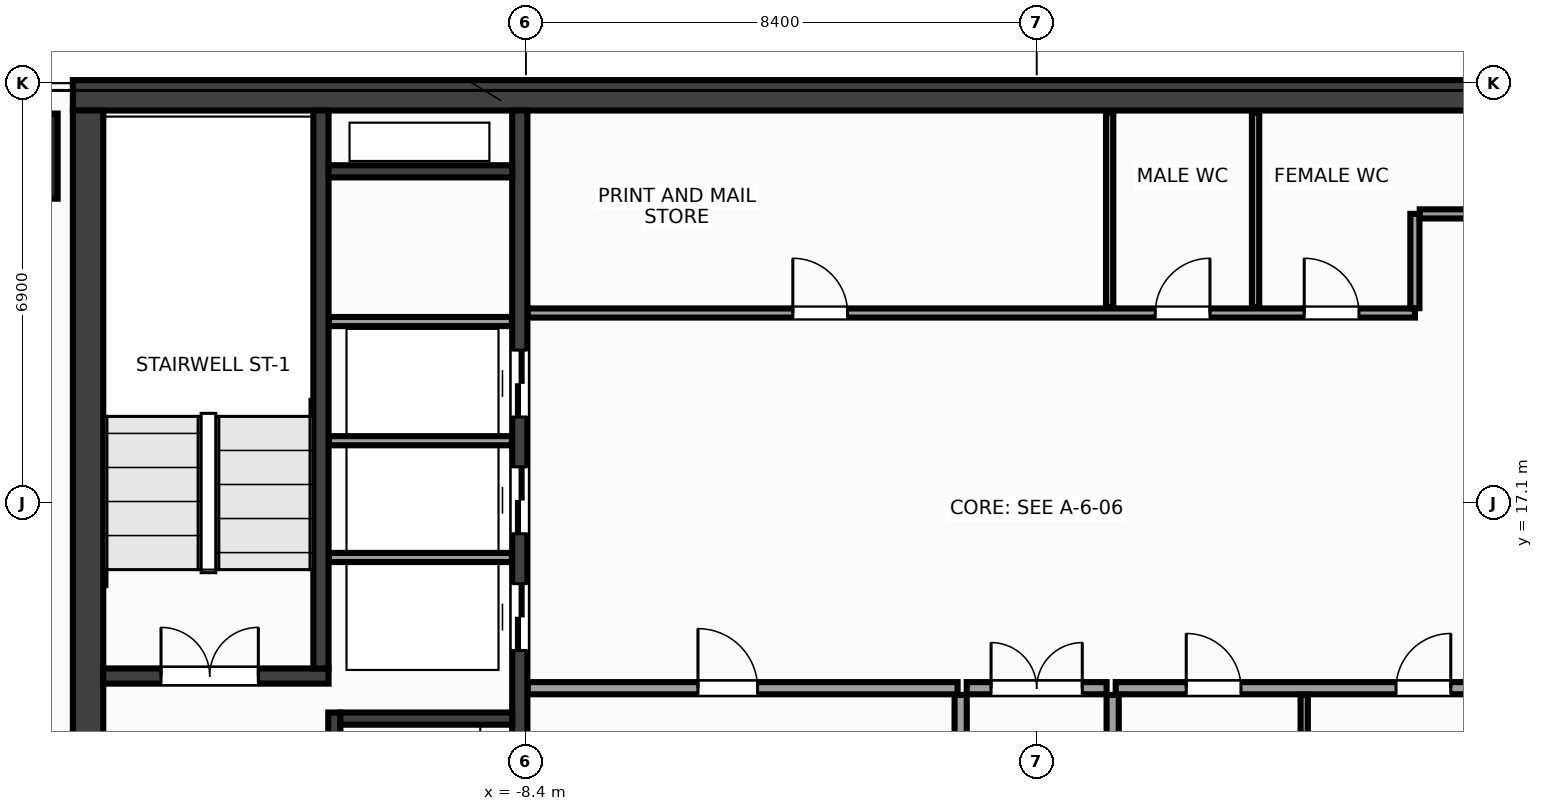
"""IFC4 building model, lengths in metres.
Left out: names, types, materials, properties, quantities, classifications, styles, units other than length and angle.
Written with IfcOpenShell. Run it as: python <this file> out.ifc"""

import sys

from ifc_helpers import new_model, si_unit, direction, frame, frame_2d, origin, origin_2d, place, context, subcontext, project, spatial, rectangle, extrude, source, transform, mapped, element, fill, save


model = new_model("IFC4")
c1 = context("Model", 3, precision=1e-05, world=origin(), true_north=direction((0.0, 1.0)))
c2 = subcontext(c1, "Body", "Model", "MODEL_VIEW")
j1 = project(units=[si_unit("LENGTHUNIT", "METRE"), si_unit("PLANEANGLEUNIT", "RADIAN")], contexts=[c1])
p1 = place(None, origin())
s1 = spatial("IfcSite", under=j1, at=p1, CompositionType="ELEMENT")
p2 = place(p1, origin())
s2 = spatial("IfcBuilding", under=s1, at=p2, CompositionType="ELEMENT")
p3 = place(p2, frame((0.0, 0.0, 221.6)))
s3 = spatial("IfcBuildingStorey", under=s2, at=p3, CompositionType="ELEMENT", Elevation=221.6)
m1 = source(origin(), c2, "Body", "SweptSolid", [
    extrude(rectangle(XDim=31.7, YDim=0.5, at=frame_2d((15.85, 0.0))), origin(), (0.0, 0.0, 1.0), 3.6),
])
p4 = place(p3, frame((-15.85, 23.8, 0.0), z_axis=(0.0, 0.0, 1.0), x_axis=(1.0, 0.0, 0.0)))
e1 = element("IfcWall", 1, at=p4, inside=s3, PredefinedType="SHEAR", context=c2, shape_type="MappedRepresentation", body=[
    mapped(m1, transform((0.0, 0.0, 0.0), x_axis=(1.0, 0.0, 0.0), y_axis=(0.0, 1.0, 0.0), z_axis=(0.0, 0.0, 1.0), scale=1.0)),
])
m2 = source(origin(), c2, "Body", "SweptSolid", [
    extrude(rectangle(XDim=13.1, YDim=0.5, at=frame_2d((6.55, 0.0))), origin(), (0.0, 0.0, 1.0), 3.6),
])
p5 = place(p3, frame((-15.6, 10.45, 0.0), z_axis=(0.0, 0.0, 1.0), x_axis=(0.0, 1.0, 0.0)))
e2 = element("IfcWall", 2, at=p5, inside=s3, PredefinedType="SHEAR", context=c2, shape_type="MappedRepresentation", body=[
    mapped(m2, transform((0.0, 0.0, 0.0), x_axis=(1.0, 0.0, 0.0), y_axis=(0.0, 1.0, 0.0), z_axis=(0.0, 0.0, 1.0), scale=1.0)),
])
m3 = source(origin(), c2, "Body", "SweptSolid", [
    extrude(rectangle(XDim=13.1, YDim=0.25, at=frame_2d((6.55, 0.0))), origin(), (0.0, 0.0, 1.0), 3.6),
])
p6 = place(p3, frame((-8.5, 10.45, 0.0), z_axis=(0.0, 0.0, 1.0), x_axis=(0.0, 1.0, 0.0)))
e3 = element("IfcWall", 3, at=p6, inside=s3, PredefinedType="SHEAR", context=c2, shape_type="MappedRepresentation", body=[
    mapped(m3, transform((0.0, 0.0, 0.0), x_axis=(1.0, 0.0, 0.0), y_axis=(0.0, 1.0, 0.0), z_axis=(0.0, 0.0, 1.0), scale=1.0)),
])
p7 = place(p6, frame((4.22, 0.0, 0.0)))
e4 = element("IfcOpeningElement", 4, at=p7, cuts=e3, PredefinedType="OPENING", context=c2, shape_type="SweptSolid", body=[
    extrude(rectangle(XDim=1.1, YDim=2.15, at=frame_2d((0.55, 1.075))), frame((0.0, 0.137, 0.0), z_axis=(0.0, -1.0, 0.0), x_axis=(1.0, 0.0, 0.0)), (0.0, 0.0, 1.0), 0.274),
])
p8 = place(p6, frame((6.14, 0.0, 0.0)))
e5 = element("IfcOpeningElement", 5, at=p8, cuts=e3, PredefinedType="OPENING", context=c2, shape_type="SweptSolid", body=[
    extrude(rectangle(XDim=1.1, YDim=2.15, at=frame_2d((0.55, 1.075))), frame((0.0, 0.137, 0.0), z_axis=(0.0, -1.0, 0.0), x_axis=(1.0, 0.0, 0.0)), (0.0, 0.0, 1.0), 0.274),
])
p9 = place(p6, frame((8.06, 0.0, 0.0)))
e6 = element("IfcOpeningElement", 6, at=p9, cuts=e3, PredefinedType="OPENING", context=c2, shape_type="SweptSolid", body=[
    extrude(rectangle(XDim=1.1, YDim=2.15, at=frame_2d((0.55, 1.075))), frame((0.0, 0.137, 0.0), z_axis=(0.0, -1.0, 0.0), x_axis=(1.0, 0.0, 0.0)), (0.0, 0.0, 1.0), 0.274),
])
m4 = source(origin(), c2, "Body", "SweptSolid", [
    extrude(rectangle(XDim=3.705, YDim=0.25, at=frame_2d((1.853, 0.0))), origin(), (0.0, 0.0, 1.0), 3.6),
])
p10 = place(p3, frame((-15.35, 14.25, 0.0), z_axis=(0.0, 0.0, 1.0), x_axis=(1.0, 0.0, 0.0)))
e7 = element("IfcWall", 7, at=p10, inside=s3, PredefinedType="SHEAR", context=c2, shape_type="MappedRepresentation", body=[
    mapped(m4, transform((0.0, 0.0, 0.0), x_axis=(1.0, 0.0, 0.0), y_axis=(0.0, 1.0, 0.0), z_axis=(0.0, 0.0, 1.0), scale=1.0)),
])
p11 = place(p10, frame((0.95, 0.0, 0.0)))
e8 = element("IfcOpeningElement", 8, at=p11, cuts=e7, PredefinedType="OPENING", context=c2, shape_type="SweptSolid", body=[
    extrude(rectangle(XDim=1.6, YDim=2.15, at=frame_2d((0.8, 1.075))), frame((0.0, 0.137, 0.0), z_axis=(0.0, -1.0, 0.0), x_axis=(1.0, 0.0, 0.0)), (0.0, 0.0, 1.0), 0.274),
])
m5 = source(origin(), c2, "Body", "SweptSolid", [
    extrude(rectangle(XDim=9.175, YDim=0.25, at=frame_2d((4.587, 0.0))), origin(), (0.0, 0.0, 1.0), 3.6),
])
p12 = place(p3, frame((-11.77, 14.375, 0.0), z_axis=(0.0, 0.0, 1.0), x_axis=(0.0, 1.0, 0.0)))
e9 = element("IfcWall", 9, at=p12, inside=s3, PredefinedType="SHEAR", context=c2, shape_type="MappedRepresentation", body=[
    mapped(m5, transform((0.0, 0.0, 0.0), x_axis=(1.0, 0.0, 0.0), y_axis=(0.0, 1.0, 0.0), z_axis=(0.0, 0.0, 1.0), scale=1.0)),
])
m6 = source(origin(), c2, "Body", "SweptSolid", [
    extrude(rectangle(XDim=3.2, YDim=0.2, at=frame_2d((1.6, 0.0))), origin(), (0.0, 0.0, 1.0), 3.6),
])
p13 = place(p3, frame((-11.55, 10.45, 0.0), z_axis=(0.0, 0.0, 1.0), x_axis=(0.0, 1.0, 0.0)))
e10 = element("IfcWall", 10, at=p13, inside=s3, PredefinedType="SHEAR", context=c2, shape_type="MappedRepresentation", body=[
    mapped(m6, transform((0.0, 0.0, 0.0), x_axis=(1.0, 0.0, 0.0), y_axis=(0.0, 1.0, 0.0), z_axis=(0.0, 0.0, 1.0), scale=1.0)),
])
p14 = place(p13, frame((0.9, 0.0, 0.0)))
e11 = element("IfcOpeningElement", 11, at=p14, cuts=e10, PredefinedType="OPENING", context=c2, shape_type="SweptSolid", body=[
    extrude(rectangle(XDim=1.1, YDim=2.15, at=frame_2d((0.55, 1.075))), frame((0.0, 0.112, 0.0), z_axis=(0.0, -1.0, 0.0), x_axis=(1.0, 0.0, 0.0)), (0.0, 0.0, 1.0), 0.224),
])
m7 = source(origin(), c2, "Body", "SweptSolid", [
    extrude(rectangle(XDim=2.825, YDim=0.2, at=frame_2d((1.413, 0.0))), origin(), (0.0, 0.0, 1.0), 3.6),
])
p15 = place(p3, frame((-11.45, 13.55, 0.0), z_axis=(0.0, 0.0, 1.0), x_axis=(1.0, 0.0, 0.0)))
e12 = element("IfcWall", 12, at=p15, inside=s3, PredefinedType="SHEAR", context=c2, shape_type="MappedRepresentation", body=[
    mapped(m7, transform((0.0, 0.0, 0.0), x_axis=(1.0, 0.0, 0.0), y_axis=(0.0, 1.0, 0.0), z_axis=(0.0, 0.0, 1.0), scale=1.0)),
])
m8 = source(origin(), c2, "Body", "SweptSolid", [
    extrude(rectangle(XDim=3.02, YDim=0.2, at=frame_2d((1.51, 0.0))), origin(), (0.0, 0.0, 1.0), 3.6),
])
p16 = place(p3, frame((-11.645, 22.55, 0.0), z_axis=(0.0, 0.0, 1.0), x_axis=(1.0, 0.0, 0.0)))
e13 = element("IfcWall", 13, at=p16, inside=s3, PredefinedType="SHEAR", context=c2, shape_type="MappedRepresentation", body=[
    mapped(m8, transform((0.0, 0.0, 0.0), x_axis=(1.0, 0.0, 0.0), y_axis=(0.0, 1.0, 0.0), z_axis=(0.0, 0.0, 1.0), scale=1.0)),
])
m9 = source(origin(), c2, "Body", "SweptSolid", [
    extrude(rectangle(XDim=1.4, YDim=1.4, at=origin_2d()), origin(), (0.0, 0.0, 1.0), 3.6),
])
p17 = place(p3, frame((-16.8, 22.8, 0.0), z_axis=(0.0, 0.0, 1.0), x_axis=(1.0, 0.0, 0.0)))
e14 = element("IfcColumn", 14, at=p17, inside=s3, PredefinedType="COLUMN", context=c2, shape_type="MappedRepresentation", body=[
    mapped(m9, transform((0.0, 0.0, 0.0), x_axis=(1.0, 0.0, 0.0), y_axis=(0.0, 1.0, 0.0), z_axis=(0.0, 0.0, 1.0), scale=1.0)),
])
m10 = source(origin(), c2, "Body", "SweptSolid", [
    extrude(rectangle(XDim=3.01, YDim=0.15, at=frame_2d((1.505, 0.0))), origin(), (0.0, 0.0, 1.0), 3.38),
])
for number, where, z_axis, x_axis in (
    (15, (-11.64, 16.2, 0.0), (0.0, 0.0, 1.0), (1.0, 0.0, 0.0)),
    (16, (-11.64, 18.12, 0.0), (0.0, 0.0, 1.0), (1.0, 0.0, 0.0)),
    (17, (-11.64, 20.08, 0.0), (0.0, 0.0, 1.0), (1.0, 0.0, 0.0)),
):
    element("IfcWall", number, at=place(p3, frame(where, z_axis=z_axis, x_axis=x_axis)), inside=s3, PredefinedType="PARTITIONING", context=c2, shape_type="MappedRepresentation", body=[
        mapped(m10, transform((0.0, 0.0, 0.0), x_axis=(1.0, 0.0, 0.0), y_axis=(0.0, 1.0, 0.0), z_axis=(0.0, 0.0, 1.0), scale=1.0)),
    ])
m11 = source(origin(), c2, "Body", "SweptSolid", [
    extrude(rectangle(XDim=7.07, YDim=0.2, at=frame_2d((3.535, 0.0))), origin(), (0.0, 0.0, 1.0), 3.38),
])
p18 = place(p3, frame((-8.37, 14.05, 0.0), z_axis=(0.0, 0.0, 1.0), x_axis=(1.0, 0.0, 0.0)))
e18 = element("IfcWall", 18, at=p18, inside=s3, PredefinedType="PARTITIONING", context=c2, shape_type="MappedRepresentation", body=[
    mapped(m11, transform((0.0, 0.0, 0.0), x_axis=(1.0, 0.0, 0.0), y_axis=(0.0, 1.0, 0.0), z_axis=(0.0, 0.0, 1.0), scale=1.0)),
])
p19 = place(p18, frame((2.8, 0.0, 0.0)))
e19 = element("IfcOpeningElement", 19, at=p19, cuts=e18, PredefinedType="OPENING", context=c2, shape_type="SweptSolid", body=[
    extrude(rectangle(XDim=0.98, YDim=2.15, at=frame_2d((0.49, 1.075))), frame((0.0, 0.112, 0.0), z_axis=(0.0, -1.0, 0.0), x_axis=(1.0, 0.0, 0.0)), (0.0, 0.0, 1.0), 0.224),
])
p20 = place(p3, frame((1.3, 14.05, 0.0), z_axis=(0.0, 0.0, 1.0), x_axis=(1.0, 0.0, 0.0)))
e20 = element("IfcWall", 20, at=p20, inside=s3, PredefinedType="PARTITIONING", context=c2, shape_type="MappedRepresentation", body=[
    mapped(m11, transform((0.0, 0.0, 0.0), x_axis=(1.0, 0.0, 0.0), y_axis=(0.0, 1.0, 0.0), z_axis=(0.0, 0.0, 1.0), scale=1.0)),
])
p21 = place(p20, frame((1.16, 0.0, 0.0)))
e21 = element("IfcOpeningElement", 21, at=p21, cuts=e20, PredefinedType="OPENING", context=c2, shape_type="SweptSolid", body=[
    extrude(rectangle(XDim=0.9, YDim=2.15, at=frame_2d((0.45, 1.075))), frame((0.0, 0.112, 0.0), z_axis=(0.0, -1.0, 0.0), x_axis=(1.0, 0.0, 0.0)), (0.0, 0.0, 1.0), 0.224),
])
p22 = place(p20, frame((4.61, 0.0, 0.0)))
e22 = element("IfcOpeningElement", 22, at=p22, cuts=e20, PredefinedType="OPENING", context=c2, shape_type="SweptSolid", body=[
    extrude(rectangle(XDim=0.9, YDim=2.15, at=frame_2d((0.45, 1.075))), frame((0.0, 0.112, 0.0), z_axis=(0.0, -1.0, 0.0), x_axis=(1.0, 0.0, 0.0)), (0.0, 0.0, 1.0), 0.224),
])
m12 = source(origin(), c2, "Body", "SweptSolid", [
    extrude(rectangle(XDim=3.49, YDim=0.2, at=frame_2d((1.745, 0.0))), origin(), (0.0, 0.0, 1.0), 3.38),
])
for number, where, z_axis, x_axis in (
    (23, (-1.25, 10.45, 0.0), (0.0, 0.0, 1.0), (0.0, 1.0, 0.0)),
    (24, (1.25, 10.45, 0.0), (0.0, 0.0, 1.0), (0.0, 1.0, 0.0)),
):
    element("IfcWall", number, at=place(p3, frame(where, z_axis=z_axis, x_axis=x_axis)), inside=s3, PredefinedType="PARTITIONING", context=c2, shape_type="MappedRepresentation", body=[
        mapped(m12, transform((0.0, 0.0, 0.0), x_axis=(1.0, 0.0, 0.0), y_axis=(0.0, 1.0, 0.0), z_axis=(0.0, 0.0, 1.0), scale=1.0)),
    ])
m13 = source(origin(), c2, "Body", "SweptSolid", [
    extrude(rectangle(XDim=2.3, YDim=0.2, at=frame_2d((1.15, 0.0))), origin(), (0.0, 0.0, 1.0), 3.38),
])
p23 = place(p3, frame((-1.15, 14.05, 0.0), z_axis=(0.0, 0.0, 1.0), x_axis=(1.0, 0.0, 0.0)))
e25 = element("IfcWall", 25, at=p23, inside=s3, PredefinedType="PARTITIONING", context=c2, shape_type="MappedRepresentation", body=[
    mapped(m13, transform((0.0, 0.0, 0.0), x_axis=(1.0, 0.0, 0.0), y_axis=(0.0, 1.0, 0.0), z_axis=(0.0, 0.0, 1.0), scale=1.0)),
])
p24 = place(p23, frame((0.4, 0.0, 0.0)))
e26 = element("IfcOpeningElement", 26, at=p24, cuts=e25, PredefinedType="OPENING", context=c2, shape_type="SweptSolid", body=[
    extrude(rectangle(XDim=1.5, YDim=2.2, at=frame_2d((0.75, 1.1))), frame((0.0, 0.112, 0.0), z_axis=(0.0, -1.0, 0.0), x_axis=(1.0, 0.0, 0.0)), (0.0, 0.0, 1.0), 0.224),
])
m14 = source(origin(), c2, "Body", "SweptSolid", [
    extrude(rectangle(XDim=14.59, YDim=0.15, at=frame_2d((7.295, 0.0))), origin(), (0.0, 0.0, 1.0), 3.38),
])
p25 = place(p3, frame((-8.37, 20.22, 0.0), z_axis=(0.0, 0.0, 1.0), x_axis=(1.0, 0.0, 0.0)))
e27 = element("IfcWall", 27, at=p25, inside=s3, PredefinedType="PARTITIONING", context=c2, shape_type="MappedRepresentation", body=[
    mapped(m14, transform((0.0, 0.0, 0.0), x_axis=(1.0, 0.0, 0.0), y_axis=(0.0, 1.0, 0.0), z_axis=(0.0, 0.0, 1.0), scale=1.0)),
])
p26 = place(p25, frame((4.36, 0.0, 0.0)))
e28 = element("IfcOpeningElement", 28, at=p26, cuts=e27, PredefinedType="OPENING", context=c2, shape_type="SweptSolid", body=[
    extrude(rectangle(XDim=0.9, YDim=2.15, at=frame_2d((0.45, 1.075))), frame((0.0, 0.087, 0.0), z_axis=(0.0, -1.0, 0.0), x_axis=(1.0, 0.0, 0.0)), (0.0, 0.0, 1.0), 0.174),
])
p27 = place(p25, frame((10.32, 0.0, 0.0)))
e29 = element("IfcOpeningElement", 29, at=p27, cuts=e27, PredefinedType="OPENING", context=c2, shape_type="SweptSolid", body=[
    extrude(rectangle(XDim=0.9, YDim=2.15, at=frame_2d((0.45, 1.075))), frame((0.0, 0.087, 0.0), z_axis=(0.0, -1.0, 0.0), x_axis=(1.0, 0.0, 0.0)), (0.0, 0.0, 1.0), 0.174),
])
p28 = place(p25, frame((12.77, 0.0, 0.0)))
e30 = element("IfcOpeningElement", 30, at=p28, cuts=e27, PredefinedType="OPENING", context=c2, shape_type="SweptSolid", body=[
    extrude(rectangle(XDim=0.9, YDim=2.15, at=frame_2d((0.45, 1.075))), frame((0.0, 0.087, 0.0), z_axis=(0.0, -1.0, 0.0), x_axis=(1.0, 0.0, 0.0)), (0.0, 0.0, 1.0), 0.174),
])
m15 = source(origin(), c2, "Body", "SweptSolid", [
    extrude(rectangle(XDim=1.55, YDim=0.15, at=frame_2d((0.775, 0.0))), origin(), (0.0, 0.0, 1.0), 3.38),
])
p29 = place(p3, frame((6.22, 20.3, 0.0), z_axis=(0.0, 0.0, 1.0), x_axis=(0.0, 1.0, 0.0)))
e31 = element("IfcWall", 31, at=p29, inside=s3, PredefinedType="PARTITIONING", context=c2, shape_type="MappedRepresentation", body=[
    mapped(m15, transform((0.0, 0.0, 0.0), x_axis=(1.0, 0.0, 0.0), y_axis=(0.0, 1.0, 0.0), z_axis=(0.0, 0.0, 1.0), scale=1.0)),
])
m16 = source(origin(), c2, "Body", "SweptSolid", [
    extrude(rectangle(XDim=2.07, YDim=0.15, at=frame_2d((1.035, 0.0))), origin(), (0.0, 0.0, 1.0), 3.38),
])
p30 = place(p3, frame((6.3, 21.85, 0.0), z_axis=(0.0, 0.0, 1.0), x_axis=(1.0, 0.0, 0.0)))
e32 = element("IfcWall", 32, at=p30, inside=s3, PredefinedType="PARTITIONING", context=c2, shape_type="MappedRepresentation", body=[
    mapped(m16, transform((0.0, 0.0, 0.0), x_axis=(1.0, 0.0, 0.0), y_axis=(0.0, 1.0, 0.0), z_axis=(0.0, 0.0, 1.0), scale=1.0)),
])
m17 = source(origin(), c2, "Body", "SweptSolid", [
    extrude(rectangle(XDim=3.49, YDim=0.12, at=frame_2d((1.745, 0.0))), origin(), (0.0, 0.0, 1.0), 3.38),
])
p31 = place(p3, frame((4.4, 10.45, 0.0), z_axis=(0.0, 0.0, 1.0), x_axis=(0.0, 1.0, 0.0)))
e33 = element("IfcWall", 33, at=p31, inside=s3, PredefinedType="PARTITIONING", context=c2, shape_type="MappedRepresentation", body=[
    mapped(m17, transform((0.0, 0.0, 0.0), x_axis=(1.0, 0.0, 0.0), y_axis=(0.0, 1.0, 0.0), z_axis=(0.0, 0.0, 1.0), scale=1.0)),
])
m18 = source(origin(), c2, "Body", "SweptSolid", [
    extrude(rectangle(XDim=3.19, YDim=0.12, at=frame_2d((1.595, 0.0))), origin(), (0.0, 0.0, 1.0), 3.38),
])
for number, where, z_axis, x_axis in (
    (34, (1.2, 20.32, 0.0), (0.0, 0.0, 1.0), (0.0, 1.0, 0.0)),
    (35, (3.6, 20.32, 0.0), (0.0, 0.0, 1.0), (0.0, 1.0, 0.0)),
):
    element("IfcWall", number, at=place(p3, frame(where, z_axis=z_axis, x_axis=x_axis)), inside=s3, PredefinedType="PARTITIONING", context=c2, shape_type="MappedRepresentation", body=[
        mapped(m18, transform((0.0, 0.0, 0.0), x_axis=(1.0, 0.0, 0.0), y_axis=(0.0, 1.0, 0.0), z_axis=(0.0, 0.0, 1.0), scale=1.0)),
    ])
m19 = source(origin(), c2, "Body", "SweptSolid", [
    extrude(rectangle(XDim=1.6, YDim=2.15, at=frame_2d((0.8, 1.075))), frame((0.0, 0.025, 0.0), z_axis=(0.0, -1.0, 0.0), x_axis=(1.0, 0.0, 0.0)), (0.0, 0.0, 1.0), 0.05),
])
p32 = place(p11, origin())
e36 = element("IfcDoor", 36, at=p32, inside=s3, OperationType="DOUBLE_DOOR_SINGLE_SWING", PredefinedType="DOOR", context=c2, shape_type="MappedRepresentation", body=[
    mapped(m19, transform((0.0, 0.0, 0.0), x_axis=(1.0, 0.0, 0.0), y_axis=(0.0, 1.0, 0.0), z_axis=(0.0, 0.0, 1.0), scale=1.0)),
])
fill(e8, e36)
m20 = source(origin(), c2, "Body", "SweptSolid", [
    extrude(rectangle(XDim=1.1, YDim=2.15, at=frame_2d((0.55, 1.075))), frame((0.0, 0.025, 0.0), z_axis=(0.0, -1.0, 0.0), x_axis=(1.0, 0.0, 0.0)), (0.0, 0.0, 1.0), 0.05),
])
p33 = place(p7, origin())
e37 = element("IfcDoor", 37, at=p33, inside=s3, OperationType="DOUBLE_DOOR_SLIDING", PredefinedType="DOOR", context=c2, shape_type="MappedRepresentation", body=[
    mapped(m20, transform((0.0, 0.0, 0.0), x_axis=(1.0, 0.0, 0.0), y_axis=(0.0, 1.0, 0.0), z_axis=(0.0, 0.0, 1.0), scale=1.0)),
])
fill(e4, e37)
p34 = place(p8, origin())
e38 = element("IfcDoor", 38, at=p34, inside=s3, OperationType="DOUBLE_DOOR_SLIDING", PredefinedType="DOOR", context=c2, shape_type="MappedRepresentation", body=[
    mapped(m20, transform((0.0, 0.0, 0.0), x_axis=(1.0, 0.0, 0.0), y_axis=(0.0, 1.0, 0.0), z_axis=(0.0, 0.0, 1.0), scale=1.0)),
])
fill(e5, e38)
p35 = place(p9, origin())
e39 = element("IfcDoor", 39, at=p35, inside=s3, OperationType="DOUBLE_DOOR_SLIDING", PredefinedType="DOOR", context=c2, shape_type="MappedRepresentation", body=[
    mapped(m20, transform((0.0, 0.0, 0.0), x_axis=(1.0, 0.0, 0.0), y_axis=(0.0, 1.0, 0.0), z_axis=(0.0, 0.0, 1.0), scale=1.0)),
])
fill(e6, e39)
m21 = source(origin(), c2, "Body", "SweptSolid", [
    extrude(rectangle(XDim=0.98, YDim=2.15, at=frame_2d((0.49, 1.075))), frame((0.0, 0.025, 0.0), z_axis=(0.0, -1.0, 0.0), x_axis=(1.0, 0.0, 0.0)), (0.0, 0.0, 1.0), 0.05),
])
p36 = place(p19, origin())
e40 = element("IfcDoor", 40, at=p36, inside=s3, OperationType="SINGLE_SWING_LEFT", PredefinedType="DOOR", context=c2, shape_type="MappedRepresentation", body=[
    mapped(m21, transform((0.0, 0.0, 0.0), x_axis=(1.0, 0.0, 0.0), y_axis=(0.0, 1.0, 0.0), z_axis=(0.0, 0.0, 1.0), scale=1.0)),
])
fill(e19, e40)
m22 = source(origin(), c2, "Body", "SweptSolid", [
    extrude(rectangle(XDim=0.9, YDim=2.15, at=frame_2d((0.45, 1.075))), frame((0.0, 0.025, 0.0), z_axis=(0.0, -1.0, 0.0), x_axis=(1.0, 0.0, 0.0)), (0.0, 0.0, 1.0), 0.05),
])
p37 = place(p21, origin())
e41 = element("IfcDoor", 41, at=p37, inside=s3, OperationType="SINGLE_SWING_LEFT", PredefinedType="DOOR", context=c2, shape_type="MappedRepresentation", body=[
    mapped(m22, transform((0.0, 0.0, 0.0), x_axis=(1.0, 0.0, 0.0), y_axis=(0.0, 1.0, 0.0), z_axis=(0.0, 0.0, 1.0), scale=1.0)),
])
fill(e21, e41)
p38 = place(p22, origin())
e42 = element("IfcDoor", 42, at=p38, inside=s3, OperationType="SINGLE_SWING_RIGHT", PredefinedType="DOOR", context=c2, shape_type="MappedRepresentation", body=[
    mapped(m22, transform((0.0, 0.0, 0.0), x_axis=(1.0, 0.0, 0.0), y_axis=(0.0, 1.0, 0.0), z_axis=(0.0, 0.0, 1.0), scale=1.0)),
])
fill(e22, e42)
m23 = source(origin(), c2, "Body", "SweptSolid", [
    extrude(rectangle(XDim=1.5, YDim=2.2, at=frame_2d((0.75, 1.1))), frame((0.0, 0.025, 0.0), z_axis=(0.0, -1.0, 0.0), x_axis=(1.0, 0.0, 0.0)), (0.0, 0.0, 1.0), 0.05),
])
p39 = place(p24, origin())
e43 = element("IfcDoor", 43, at=p39, inside=s3, OperationType="DOUBLE_DOOR_SINGLE_SWING", PredefinedType="DOOR", context=c2, shape_type="MappedRepresentation", body=[
    mapped(m23, transform((0.0, 0.0, 0.0), x_axis=(1.0, 0.0, 0.0), y_axis=(0.0, 1.0, 0.0), z_axis=(0.0, 0.0, 1.0), scale=1.0)),
])
fill(e26, e43)
p40 = place(p26, origin())
e44 = element("IfcDoor", 44, at=p40, inside=s3, OperationType="SINGLE_SWING_LEFT", PredefinedType="DOOR", context=c2, shape_type="MappedRepresentation", body=[
    mapped(m22, transform((0.0, 0.0, 0.0), x_axis=(1.0, 0.0, 0.0), y_axis=(0.0, 1.0, 0.0), z_axis=(0.0, 0.0, 1.0), scale=1.0)),
])
fill(e28, e44)
p41 = place(p27, origin())
e45 = element("IfcDoor", 45, at=p41, inside=s3, OperationType="SINGLE_SWING_RIGHT", PredefinedType="DOOR", context=c2, shape_type="MappedRepresentation", body=[
    mapped(m22, transform((0.0, 0.0, 0.0), x_axis=(1.0, 0.0, 0.0), y_axis=(0.0, 1.0, 0.0), z_axis=(0.0, 0.0, 1.0), scale=1.0)),
])
fill(e29, e45)
p42 = place(p28, origin())
e46 = element("IfcDoor", 46, at=p42, inside=s3, OperationType="SINGLE_SWING_LEFT", PredefinedType="DOOR", context=c2, shape_type="MappedRepresentation", body=[
    mapped(m22, transform((0.0, 0.0, 0.0), x_axis=(1.0, 0.0, 0.0), y_axis=(0.0, 1.0, 0.0), z_axis=(0.0, 0.0, 1.0), scale=1.0)),
])
fill(e30, e46)
save(model, sys.argv[1])
